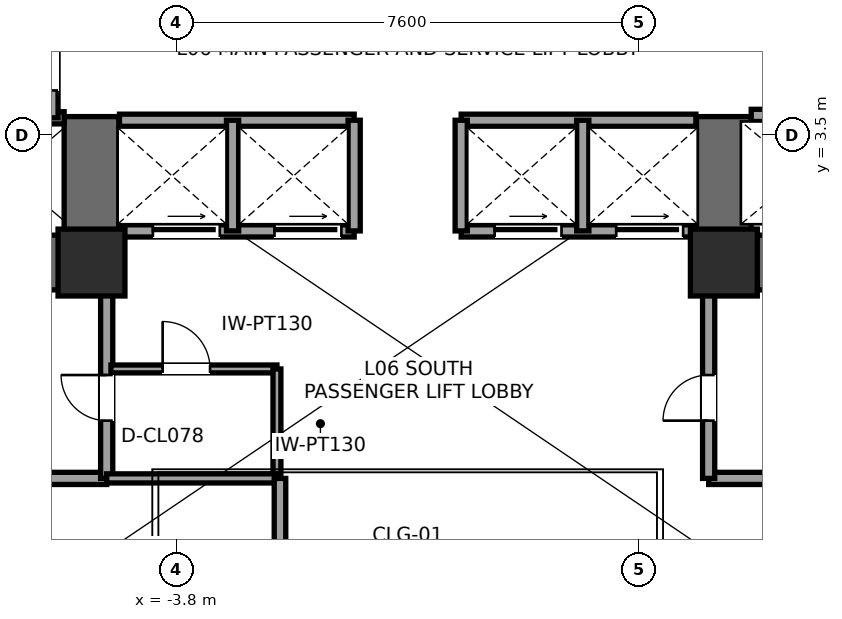
"""IFC4 building model, lengths in metres.
Left out: names, types, materials, properties, quantities, classifications, styles, units other than length and angle.
Written with IfcOpenShell. Run it as: python <this file> out.ifc"""

import sys

from ifc_helpers import new_model, si_unit, direction, frame, frame_2d, origin, origin_2d, place, context, subcontext, project, spatial, rectangle, extrude, element, fill, save


model = new_model("IFC4")
c1 = context("Model", 3, precision=1e-05, world=origin(), true_north=direction((0.0, 1.0)))
c2 = subcontext(c1, "Body", "Model", "MODEL_VIEW")
j1 = project(units=[si_unit("LENGTHUNIT", "METRE"), si_unit("PLANEANGLEUNIT", "RADIAN")], contexts=[c1])
p1 = place(None, origin())
s1 = spatial("IfcSite", under=j1, at=p1, CompositionType="ELEMENT")
p2 = place(p1, origin())
s2 = spatial("IfcBuilding", under=s1, at=p2, CompositionType="ELEMENT")
p3 = place(p2, frame((0.0, 0.0, 27.0)))
s3 = spatial("IfcBuildingStorey", under=s2, at=p3, CompositionType="ELEMENT", Elevation=27.0)
p4 = place(p3, frame((-4.75, 1.4, 0.0), z_axis=(0.0, 0.0, 1.0), x_axis=(-1.0, 0.0, 0.0)))
e1 = element("IfcWall", 1, at=p4, inside=s3, PredefinedType="SHEAR", context=c2, shape_type="SweptSolid", body=[
    extrude(rectangle(XDim=9.3, YDim=0.9, at=frame_2d((4.65, 0.0))), origin(), (0.0, 0.0, 1.0), 3.6),
])
p5 = place(p4, frame((5.55, 0.0, 0.0)))
e2 = element("IfcOpeningElement", 2, at=p5, cuts=e1, PredefinedType="OPENING", context=c2, shape_type="SweptSolid", body=[
    extrude(rectangle(XDim=1.05, YDim=2.15, at=frame_2d((0.525, 1.075))), frame((0.0, 0.46, 0.0), z_axis=(0.0, -1.0, 0.0), x_axis=(1.0, 0.0, 0.0)), (0.0, 0.0, 1.0), 0.92),
])
p6 = place(p4, frame((3.88, 0.0, 0.0)))
e3 = element("IfcOpeningElement", 3, at=p6, cuts=e1, PredefinedType="OPENING", context=c2, shape_type="SweptSolid", body=[
    extrude(rectangle(XDim=1.1, YDim=2.2, at=frame_2d((0.55, 1.1))), frame((0.0, 0.46, 0.0), z_axis=(0.0, -1.0, 0.0), x_axis=(1.0, 0.0, 0.0)), (0.0, 0.0, 1.0), 0.92),
])
p7 = place(p3, frame((-5.2, 0.95, 0.0), z_axis=(0.0, 0.0, 1.0), x_axis=(0.0, 1.0, 0.0)))
e4 = element("IfcWall", 4, at=p7, inside=s3, PredefinedType="SHEAR", context=c2, shape_type="SweptSolid", body=[
    extrude(rectangle(XDim=2.85, YDim=0.9, at=frame_2d((1.425, 0.0))), origin(), (0.0, 0.0, 1.0), 3.6),
])
p8 = place(p3, frame((14.05, 1.4, 0.0), z_axis=(0.0, 0.0, 1.0), x_axis=(-1.0, 0.0, 0.0)))
e5 = element("IfcWall", 5, at=p8, inside=s3, PredefinedType="SHEAR", context=c2, shape_type="SweptSolid", body=[
    extrude(rectangle(XDim=9.3, YDim=0.9, at=frame_2d((4.65, 0.0))), origin(), (0.0, 0.0, 1.0), 3.6),
])
p9 = place(p8, frame((2.7, 0.0, 0.0)))
e6 = element("IfcOpeningElement", 6, at=p9, cuts=e5, PredefinedType="OPENING", context=c2, shape_type="SweptSolid", body=[
    extrude(rectangle(XDim=1.05, YDim=2.15, at=frame_2d((0.525, 1.075))), frame((0.0, 0.46, 0.0), z_axis=(0.0, -1.0, 0.0), x_axis=(1.0, 0.0, 0.0)), (0.0, 0.0, 1.0), 0.92),
])
p10 = place(p8, frame((4.7, 0.0, 0.0)))
e7 = element("IfcOpeningElement", 7, at=p10, cuts=e5, PredefinedType="OPENING", context=c2, shape_type="SweptSolid", body=[
    extrude(rectangle(XDim=1.1, YDim=2.2, at=frame_2d((0.55, 1.1))), frame((0.0, 0.46, 0.0), z_axis=(0.0, -1.0, 0.0), x_axis=(1.0, 0.0, 0.0)), (0.0, 0.0, 1.0), 0.92),
])
p11 = place(p3, frame((5.2, 0.95, 0.0), z_axis=(0.0, 0.0, 1.0), x_axis=(0.0, 1.0, 0.0)))
e8 = element("IfcWall", 8, at=p11, inside=s3, PredefinedType="SHEAR", context=c2, shape_type="SweptSolid", body=[
    extrude(rectangle(XDim=2.85, YDim=0.9, at=frame_2d((1.425, 0.0))), origin(), (0.0, 0.0, 1.0), 3.6),
])
for number, where, z_axis, x_axis in (
    (9, (-5.2, 1.4, 0.0), (0.0, 0.0, 1.0), (1.0, 0.0, 0.0)),
    (10, (5.2, 1.4, 0.0), (0.0, 0.0, 1.0), (1.0, 0.0, 0.0)),
):
    element("IfcColumn", number, at=place(p3, frame(where, z_axis=z_axis, x_axis=x_axis)), inside=s3, PredefinedType="COLUMN", context=c2, shape_type="SweptSolid", body=[
        extrude(rectangle(XDim=1.1, YDim=1.1, at=origin_2d()), origin(), (0.0, 0.0, 1.0), 3.6),
    ])
p12 = place(p3, frame((-7.2, -2.15, 0.0), z_axis=(0.0, 0.0, 1.0), x_axis=(1.0, 0.0, 0.0)))
e11 = element("IfcWall", 11, at=p12, inside=s3, PredefinedType="SOLIDWALL", context=c2, shape_type="SweptSolid", body=[
    extrude(rectangle(XDim=2.25, YDim=0.2, at=frame_2d((1.125, 0.0))), origin(), (0.0, 0.0, 1.0), 3.4),
])
p13 = place(p3, frame((-4.95, -2.15, 0.0), z_axis=(0.0, 0.0, 1.0), x_axis=(0.0, 1.0, 0.0)))
e12 = element("IfcWall", 12, at=p13, inside=s3, PredefinedType="SOLIDWALL", context=c2, shape_type="SweptSolid", body=[
    extrude(rectangle(XDim=3.15, YDim=0.2, at=frame_2d((1.575, 0.0))), origin(), (0.0, 0.0, 1.0), 2.853),
])
p14 = place(p13, frame((0.95, 0.0, 0.0)))
e13 = element("IfcOpeningElement", 13, at=p14, cuts=e12, PredefinedType="OPENING", context=c2, shape_type="SweptSolid", body=[
    extrude(rectangle(XDim=0.75, YDim=2.1, at=frame_2d((0.375, 1.05))), frame((0.0, 0.11, 0.0), z_axis=(0.0, -1.0, 0.0), x_axis=(1.0, 0.0, 0.0)), (0.0, 0.0, 1.0), 0.22),
])
p15 = place(p3, frame((4.95, -2.15, 0.0), z_axis=(0.0, 0.0, 1.0), x_axis=(1.0, 0.0, 0.0)))
e14 = element("IfcWall", 14, at=p15, inside=s3, PredefinedType="SOLIDWALL", context=c2, shape_type="SweptSolid", body=[
    extrude(rectangle(XDim=2.25, YDim=0.2, at=frame_2d((1.125, 0.0))), origin(), (0.0, 0.0, 1.0), 3.4),
])
p16 = place(p3, frame((4.95, -2.15, 0.0), z_axis=(0.0, 0.0, 1.0), x_axis=(0.0, 1.0, 0.0)))
e15 = element("IfcWall", 15, at=p16, inside=s3, PredefinedType="SOLIDWALL", context=c2, shape_type="SweptSolid", body=[
    extrude(rectangle(XDim=3.15, YDim=0.2, at=frame_2d((1.575, 0.0))), origin(), (0.0, 0.0, 1.0), 2.853),
])
p17 = place(p16, frame((0.95, 0.0, 0.0)))
e16 = element("IfcOpeningElement", 16, at=p17, cuts=e15, PredefinedType="OPENING", context=c2, shape_type="SweptSolid", body=[
    extrude(rectangle(XDim=0.75, YDim=2.1, at=frame_2d((0.375, 1.05))), frame((0.0, 0.11, 0.0), z_axis=(0.0, -1.0, 0.0), x_axis=(1.0, 0.0, 0.0)), (0.0, 0.0, 1.0), 0.22),
])
p18 = place(p3, frame((-4.88, -0.35, 0.0), z_axis=(0.0, 0.0, 1.0), x_axis=(1.0, 0.0, 0.0)))
e17 = element("IfcWall", 17, at=p18, inside=s3, PredefinedType="PARTITIONING", context=c2, shape_type="SweptSolid", body=[
    extrude(rectangle(XDim=2.73, YDim=0.13, at=frame_2d((1.365, 0.0))), origin(), (0.0, 0.0, 1.0), 3.4),
])
p19 = place(p18, frame((0.85, 0.0, 0.0)))
e18 = element("IfcOpeningElement", 18, at=p19, cuts=e17, PredefinedType="OPENING", context=c2, shape_type="SweptSolid", body=[
    extrude(rectangle(XDim=0.78, YDim=2.1, at=frame_2d((0.39, 1.05))), frame((0.0, 0.075, 0.0), z_axis=(0.0, -1.0, 0.0), x_axis=(1.0, 0.0, 0.0)), (0.0, 0.0, 1.0), 0.15),
])
p20 = place(p3, frame((-2.15, -2.15, 0.0), z_axis=(0.0, 0.0, 1.0), x_axis=(0.0, 1.0, 0.0)))
e19 = element("IfcWall", 19, at=p20, inside=s3, PredefinedType="PARTITIONING", context=c2, shape_type="SweptSolid", body=[
    extrude(rectangle(XDim=1.8, YDim=0.13, at=frame_2d((0.9, 0.0))), origin(), (0.0, 0.0, 1.0), 3.4),
])
p21 = place(p3, frame((-9.78, 3.78, 0.0), z_axis=(0.0, 0.0, 1.0), x_axis=(1.0, 0.0, 0.0)))
e20 = element("IfcWall", 20, at=p21, inside=s3, PredefinedType="SOLIDWALL", context=c2, shape_type="SweptSolid", body=[
    extrude(rectangle(XDim=4.13, YDim=0.2, at=frame_2d((2.065, 0.0))), origin(), (0.0, 0.0, 1.0), 3.4),
])
p22 = place(p3, frame((-5.85, 3.78, 0.0), z_axis=(0.0, 0.0, 1.0), x_axis=(0.0, 1.0, 0.0)))
e21 = element("IfcWall", 21, at=p22, inside=s3, PredefinedType="SOLIDWALL", context=c2, shape_type="SweptSolid", body=[
    extrude(rectangle(XDim=1.69, YDim=0.2, at=frame_2d((0.845, 0.0))), origin(), (0.0, 0.0, 1.0), 3.4),
])
p23 = place(p22, frame((0.45, 0.0, 0.0)))
e22 = element("IfcOpeningElement", 22, at=p23, cuts=e21, PredefinedType="OPENING", context=c2, shape_type="SweptSolid", body=[
    extrude(rectangle(XDim=0.75, YDim=2.1, at=frame_2d((0.375, 1.05))), frame((0.0, 0.11, 0.0), z_axis=(0.0, -1.0, 0.0), x_axis=(1.0, 0.0, 0.0)), (0.0, 0.0, 1.0), 0.22),
])
p24 = place(p3, frame((5.65, 3.82, 0.0), z_axis=(0.0, 0.0, 1.0), x_axis=(1.0, 0.0, 0.0)))
e23 = element("IfcWall", 23, at=p24, inside=s3, PredefinedType="SOLIDWALL", context=c2, shape_type="SweptSolid", body=[
    extrude(rectangle(XDim=4.13, YDim=0.2, at=frame_2d((2.065, 0.0))), origin(), (0.0, 0.0, 1.0), 3.4),
])
p25 = place(p24, frame((0.65, 0.0, 0.0)))
e24 = element("IfcOpeningElement", 24, at=p25, cuts=e23, PredefinedType="OPENING", context=c2, shape_type="SweptSolid", body=[
    extrude(rectangle(XDim=1.2, YDim=2.2, at=frame_2d((0.6, 1.1))), frame((0.0, 0.11, 0.0), z_axis=(0.0, -1.0, 0.0), x_axis=(1.0, 0.0, 0.0)), (0.0, 0.0, 1.0), 0.22),
])
p26 = place(p3, frame((-4.74, 1.92, 0.0), z_axis=(0.0, 0.0, 1.0), x_axis=(1.0, 0.0, 0.0)))
e25 = element("IfcWall", 25, at=p26, inside=s3, PredefinedType="SOLIDWALL", context=c2, shape_type="SweptSolid", body=[
    extrude(rectangle(XDim=3.86, YDim=0.2, at=frame_2d((1.93, 0.0))), origin(), (0.0, 0.0, 1.0), 2.39),
])
p27 = place(p26, frame((0.55, 0.0, 0.0)))
e26 = element("IfcOpeningElement", 26, at=p27, cuts=e25, PredefinedType="OPENING", context=c2, shape_type="SweptSolid", body=[
    extrude(rectangle(XDim=1.1, YDim=2.2, at=frame_2d((0.55, 1.1))), frame((0.0, 0.11, 0.0), z_axis=(0.0, -1.0, 0.0), x_axis=(1.0, 0.0, 0.0)), (0.0, 0.0, 1.0), 0.22),
])
p28 = place(p26, frame((2.55, 0.0, 0.0)))
e27 = element("IfcOpeningElement", 27, at=p28, cuts=e25, PredefinedType="OPENING", context=c2, shape_type="SweptSolid", body=[
    extrude(rectangle(XDim=1.1, YDim=2.2, at=frame_2d((0.55, 1.1))), frame((0.0, 0.11, 0.0), z_axis=(0.0, -1.0, 0.0), x_axis=(1.0, 0.0, 0.0)), (0.0, 0.0, 1.0), 0.22),
])
p29 = place(p3, frame((0.88, 1.92, 0.0), z_axis=(0.0, 0.0, 1.0), x_axis=(1.0, 0.0, 0.0)))
e28 = element("IfcWall", 28, at=p29, inside=s3, PredefinedType="SOLIDWALL", context=c2, shape_type="SweptSolid", body=[
    extrude(rectangle(XDim=3.86, YDim=0.2, at=frame_2d((1.93, 0.0))), origin(), (0.0, 0.0, 1.0), 2.39),
])
p30 = place(p29, frame((0.55, 0.0, 0.0)))
e29 = element("IfcOpeningElement", 29, at=p30, cuts=e28, PredefinedType="OPENING", context=c2, shape_type="SweptSolid", body=[
    extrude(rectangle(XDim=1.1, YDim=2.2, at=frame_2d((0.55, 1.1))), frame((0.0, 0.11, 0.0), z_axis=(0.0, -1.0, 0.0), x_axis=(1.0, 0.0, 0.0)), (0.0, 0.0, 1.0), 0.22),
])
p31 = place(p29, frame((2.55, 0.0, 0.0)))
e30 = element("IfcOpeningElement", 30, at=p31, cuts=e28, PredefinedType="OPENING", context=c2, shape_type="SweptSolid", body=[
    extrude(rectangle(XDim=1.1, YDim=2.2, at=frame_2d((0.55, 1.1))), frame((0.0, 0.11, 0.0), z_axis=(0.0, -1.0, 0.0), x_axis=(1.0, 0.0, 0.0)), (0.0, 0.0, 1.0), 0.22),
])
for number, where, z_axis, x_axis in (
    (31, (-4.74, 3.74, 0.0), (0.0, 0.0, 1.0), (1.0, 0.0, 0.0)),
    (32, (0.88, 3.74, 0.0), (0.0, 0.0, 1.0), (1.0, 0.0, 0.0)),
):
    element("IfcWall", number, at=place(p3, frame(where, z_axis=z_axis, x_axis=x_axis)), inside=s3, PredefinedType="SOLIDWALL", context=c2, shape_type="SweptSolid", body=[
        extrude(rectangle(XDim=3.86, YDim=0.2, at=frame_2d((1.93, 0.0))), origin(), (0.0, 0.0, 1.0), 3.4),
    ])
for number, where, z_axis, x_axis in (
    (33, (-2.88, 1.92, 0.0), (0.0, 0.0, 1.0), (0.0, 1.0, 0.0)),
    (34, (2.88, 1.92, 0.0), (0.0, 0.0, 1.0), (0.0, 1.0, 0.0)),
    (35, (-0.88, 1.92, 0.0), (0.0, 0.0, 1.0), (0.0, 1.0, 0.0)),
    (36, (0.88, 1.92, 0.0), (0.0, 0.0, 1.0), (0.0, 1.0, 0.0)),
):
    element("IfcWall", number, at=place(p3, frame(where, z_axis=z_axis, x_axis=x_axis)), inside=s3, PredefinedType="SOLIDWALL", context=c2, shape_type="SweptSolid", body=[
        extrude(rectangle(XDim=1.82, YDim=0.2, at=frame_2d((0.91, 0.0))), origin(), (0.0, 0.0, 1.0), 3.4),
    ])
p32 = place(p3, frame((-4.95, -2.15, 0.0), z_axis=(0.0, 0.0, 1.0), x_axis=(1.0, 0.0, 0.0)))
e37 = element("IfcWall", 37, at=p32, inside=s3, PredefinedType="PLUMBINGWALL", context=c2, shape_type="SweptSolid", body=[
    extrude(rectangle(XDim=2.85, YDim=0.15, at=frame_2d((1.425, 0.0))), origin(), (0.0, 0.0, 1.0), 2.853),
])
p33 = place(p3, frame((-2.1, -4.05, 0.0), z_axis=(0.0, 0.0, 1.0), x_axis=(0.0, 1.0, 0.0)))
e38 = element("IfcWall", 38, at=p33, inside=s3, PredefinedType="PLUMBINGWALL", context=c2, shape_type="SweptSolid", body=[
    extrude(rectangle(XDim=1.9, YDim=0.19, at=frame_2d((0.95, 0.0))), origin(), (0.0, 0.0, 1.0), 3.4),
])
p34 = place(p14, origin())
e39 = element("IfcDoor", 39, at=p34, inside=s3, OperationType="SINGLE_SWING_RIGHT", PredefinedType="DOOR", context=c2, shape_type="SweptSolid", body=[
    extrude(rectangle(XDim=0.75, YDim=2.1, at=frame_2d((0.375, 1.05))), frame((0.0, 0.025, 0.0), z_axis=(0.0, -1.0, 0.0), x_axis=(1.0, 0.0, 0.0)), (0.0, 0.0, 1.0), 0.05),
])
fill(e13, e39)
p35 = place(p17, origin())
e40 = element("IfcDoor", 40, at=p35, inside=s3, OperationType="SINGLE_SWING_LEFT", PredefinedType="DOOR", context=c2, shape_type="SweptSolid", body=[
    extrude(rectangle(XDim=0.75, YDim=2.1, at=frame_2d((0.375, 1.05))), frame((0.0, 0.025, 0.0), z_axis=(0.0, -1.0, 0.0), x_axis=(1.0, 0.0, 0.0)), (0.0, 0.0, 1.0), 0.05),
])
fill(e16, e40)
p36 = place(p19, origin())
e41 = element("IfcDoor", 41, at=p36, inside=s3, OperationType="SINGLE_SWING_LEFT", PredefinedType="DOOR", context=c2, shape_type="SweptSolid", body=[
    extrude(rectangle(XDim=0.78, YDim=2.1, at=frame_2d((0.39, 1.05))), frame((0.0, 0.025, 0.0), z_axis=(0.0, -1.0, 0.0), x_axis=(1.0, 0.0, 0.0)), (0.0, 0.0, 1.0), 0.05),
])
fill(e18, e41)
p37 = place(p23, origin())
e42 = element("IfcDoor", 42, at=p37, inside=s3, OperationType="SINGLE_SWING_RIGHT", PredefinedType="DOOR", context=c2, shape_type="SweptSolid", body=[
    extrude(rectangle(XDim=0.75, YDim=2.1, at=frame_2d((0.375, 1.05))), frame((0.0, 0.025, 0.0), z_axis=(0.0, -1.0, 0.0), x_axis=(1.0, 0.0, 0.0)), (0.0, 0.0, 1.0), 0.05),
])
fill(e22, e42)
p38 = place(p27, origin())
e43 = element("IfcDoor", 43, at=p38, inside=s3, OperationType="SLIDING_TO_LEFT", PredefinedType="DOOR", context=c2, shape_type="SweptSolid", body=[
    extrude(rectangle(XDim=1.1, YDim=2.2, at=frame_2d((0.55, 1.1))), frame((0.0, 0.025, 0.0), z_axis=(0.0, -1.0, 0.0), x_axis=(1.0, 0.0, 0.0)), (0.0, 0.0, 1.0), 0.05),
])
fill(e26, e43)
p39 = place(p28, origin())
e44 = element("IfcDoor", 44, at=p39, inside=s3, OperationType="SLIDING_TO_LEFT", PredefinedType="DOOR", context=c2, shape_type="SweptSolid", body=[
    extrude(rectangle(XDim=1.1, YDim=2.2, at=frame_2d((0.55, 1.1))), frame((0.0, 0.025, 0.0), z_axis=(0.0, -1.0, 0.0), x_axis=(1.0, 0.0, 0.0)), (0.0, 0.0, 1.0), 0.05),
])
fill(e27, e44)
p40 = place(p30, origin())
e45 = element("IfcDoor", 45, at=p40, inside=s3, OperationType="SLIDING_TO_LEFT", PredefinedType="DOOR", context=c2, shape_type="SweptSolid", body=[
    extrude(rectangle(XDim=1.1, YDim=2.2, at=frame_2d((0.55, 1.1))), frame((0.0, 0.025, 0.0), z_axis=(0.0, -1.0, 0.0), x_axis=(1.0, 0.0, 0.0)), (0.0, 0.0, 1.0), 0.05),
])
fill(e29, e45)
p41 = place(p31, origin())
e46 = element("IfcDoor", 46, at=p41, inside=s3, OperationType="SLIDING_TO_LEFT", PredefinedType="DOOR", context=c2, shape_type="SweptSolid", body=[
    extrude(rectangle(XDim=1.1, YDim=2.2, at=frame_2d((0.55, 1.1))), frame((0.0, 0.025, 0.0), z_axis=(0.0, -1.0, 0.0), x_axis=(1.0, 0.0, 0.0)), (0.0, 0.0, 1.0), 0.05),
])
fill(e30, e46)
save(model, sys.argv[1])
